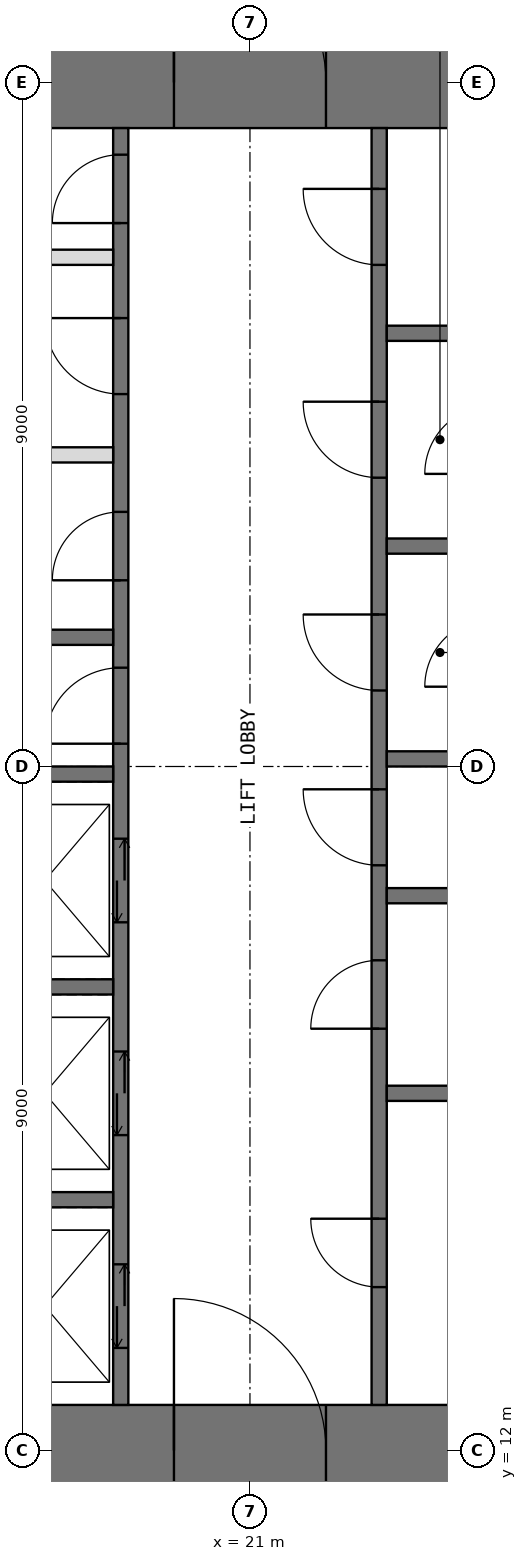
"""IFC4 building model, lengths in metres.
Left out: names, types, materials, properties, quantities, classifications, styles, units other than length and angle.
Written with IfcOpenShell. Run it as: python <this file> out.ifc"""

import sys

from ifc_helpers import new_model, si_unit, direction, frame, frame_2d, origin, place, context, subcontext, project, spatial, rectangle, extrude, element, fill, save


model = new_model("IFC4")
c1 = context("Model", 3, precision=1e-05, world=origin(), true_north=direction((0.0, 1.0)))
c2 = subcontext(c1, "Body", "Model", "MODEL_VIEW")
j1 = project(units=[si_unit("LENGTHUNIT", "METRE"), si_unit("PLANEANGLEUNIT", "RADIAN")], contexts=[c1])
p1 = place(None, origin())
s1 = spatial("IfcSite", under=j1, at=p1, CompositionType="ELEMENT")
p2 = place(p1, origin())
s2 = spatial("IfcBuilding", under=s1, at=p2, CompositionType="ELEMENT")
p3 = place(p2, frame((0.0, 0.0, 252.4)))
s3 = spatial("IfcBuildingStorey", under=s2, at=p3, CompositionType="ELEMENT", Elevation=252.4)
p4 = place(p3, frame((11.4, 12.0, -0.05), z_axis=(0.0, 0.0, 1.0), x_axis=(1.0, 0.0, 0.0)))
e1 = element("IfcWall", 1, at=p4, inside=s3, PredefinedType="SHEAR", context=c2, shape_type="SweptSolid", body=[
    extrude(rectangle(XDim=19.2, YDim=1.2, at=frame_2d((9.6, 0.0))), origin(), (0.0, 0.0, 1.0), 4.2),
])
p5 = place(p4, frame((8.6, 0.0, 0.05)))
e2 = element("IfcOpeningElement", 2, at=p5, cuts=e1, PredefinedType="OPENING", context=c2, shape_type="SweptSolid", body=[
    extrude(rectangle(XDim=2.0, YDim=2.2, at=frame_2d((1.0, 1.1))), frame((0.0, 0.61, 0.0), z_axis=(0.0, -1.0, 0.0), x_axis=(1.0, 0.0, 0.0)), (0.0, 0.0, 1.0), 1.22),
])
p6 = place(p3, frame((11.4, 30.0, -0.05), z_axis=(0.0, 0.0, 1.0), x_axis=(1.0, 0.0, 0.0)))
e3 = element("IfcWall", 3, at=p6, inside=s3, PredefinedType="SHEAR", context=c2, shape_type="SweptSolid", body=[
    extrude(rectangle(XDim=19.2, YDim=1.2, at=frame_2d((9.6, 0.0))), origin(), (0.0, 0.0, 1.0), 4.2),
])
p7 = place(p6, frame((8.6, 0.0, 0.05)))
e4 = element("IfcOpeningElement", 4, at=p7, cuts=e3, PredefinedType="OPENING", context=c2, shape_type="SweptSolid", body=[
    extrude(rectangle(XDim=2.0, YDim=2.2, at=frame_2d((1.0, 1.1))), frame((0.0, 0.61, 0.0), z_axis=(0.0, -1.0, 0.0), x_axis=(1.0, 0.0, 0.0)), (0.0, 0.0, 1.0), 1.22),
])
p8 = place(p3, frame((19.3, 12.6, -0.05), z_axis=(0.0, 0.0, 1.0), x_axis=(0.0, 1.0, 0.0)))
e5 = element("IfcWall", 5, at=p8, inside=s3, PredefinedType="SHEAR", context=c2, shape_type="SweptSolid", body=[
    extrude(rectangle(XDim=16.8, YDim=0.2, at=frame_2d((8.4, 0.0))), origin(), (0.0, 0.0, 1.0), 4.2),
])
p9 = place(p8, frame((8.7, 0.0, 0.05)))
e6 = element("IfcOpeningElement", 6, at=p9, cuts=e5, PredefinedType="OPENING", context=c2, shape_type="SweptSolid", body=[
    extrude(rectangle(XDim=1.0, YDim=2.2, at=frame_2d((0.5, 1.1))), frame((0.0, 0.11, 0.0), z_axis=(0.0, -1.0, 0.0), x_axis=(1.0, 0.0, 0.0)), (0.0, 0.0, 1.0), 0.22),
])
p10 = place(p8, frame((10.85, 0.0, 0.05)))
e7 = element("IfcOpeningElement", 7, at=p10, cuts=e5, PredefinedType="OPENING", context=c2, shape_type="SweptSolid", body=[
    extrude(rectangle(XDim=0.9, YDim=2.2, at=frame_2d((0.45, 1.1))), frame((0.0, 0.11, 0.0), z_axis=(0.0, -1.0, 0.0), x_axis=(1.0, 0.0, 0.0)), (0.0, 0.0, 1.0), 0.22),
])
p11 = place(p8, frame((13.3, 0.0, 0.05)))
e8 = element("IfcOpeningElement", 8, at=p11, cuts=e5, PredefinedType="OPENING", context=c2, shape_type="SweptSolid", body=[
    extrude(rectangle(XDim=1.0, YDim=2.2, at=frame_2d((0.5, 1.1))), frame((0.0, 0.11, 0.0), z_axis=(0.0, -1.0, 0.0), x_axis=(1.0, 0.0, 0.0)), (0.0, 0.0, 1.0), 0.22),
])
p12 = place(p8, frame((15.55, 0.0, 0.05)))
e9 = element("IfcOpeningElement", 9, at=p12, cuts=e5, PredefinedType="OPENING", context=c2, shape_type="SweptSolid", body=[
    extrude(rectangle(XDim=0.9, YDim=2.2, at=frame_2d((0.45, 1.1))), frame((0.0, 0.11, 0.0), z_axis=(0.0, -1.0, 0.0), x_axis=(1.0, 0.0, 0.0)), (0.0, 0.0, 1.0), 0.22),
])
p13 = place(p8, frame((0.75, 0.0, 0.05)))
e10 = element("IfcOpeningElement", 10, at=p13, cuts=e5, PredefinedType="OPENING", context=c2, shape_type="SweptSolid", body=[
    extrude(rectangle(XDim=1.1, YDim=2.2, at=frame_2d((0.55, 1.1))), frame((0.0, 0.11, 0.0), z_axis=(0.0, -1.0, 0.0), x_axis=(1.0, 0.0, 0.0)), (0.0, 0.0, 1.0), 0.22),
])
p14 = place(p8, frame((3.55, 0.0, 0.05)))
e11 = element("IfcOpeningElement", 11, at=p14, cuts=e5, PredefinedType="OPENING", context=c2, shape_type="SweptSolid", body=[
    extrude(rectangle(XDim=1.1, YDim=2.2, at=frame_2d((0.55, 1.1))), frame((0.0, 0.11, 0.0), z_axis=(0.0, -1.0, 0.0), x_axis=(1.0, 0.0, 0.0)), (0.0, 0.0, 1.0), 0.22),
])
p15 = place(p8, frame((6.35, 0.0, 0.05)))
e12 = element("IfcOpeningElement", 12, at=p15, cuts=e5, PredefinedType="OPENING", context=c2, shape_type="SweptSolid", body=[
    extrude(rectangle(XDim=1.1, YDim=2.2, at=frame_2d((0.55, 1.1))), frame((0.0, 0.11, 0.0), z_axis=(0.0, -1.0, 0.0), x_axis=(1.0, 0.0, 0.0)), (0.0, 0.0, 1.0), 0.22),
])
p16 = place(p3, frame((22.7, 12.6, -0.05), z_axis=(0.0, 0.0, 1.0), x_axis=(0.0, 1.0, 0.0)))
e13 = element("IfcWall", 13, at=p16, inside=s3, PredefinedType="SHEAR", context=c2, shape_type="SweptSolid", body=[
    extrude(rectangle(XDim=16.8, YDim=0.2, at=frame_2d((8.4, 0.0))), origin(), (0.0, 0.0, 1.0), 4.2),
])
p17 = place(p16, frame((7.1, 0.0, 0.05)))
e14 = element("IfcOpeningElement", 14, at=p17, cuts=e13, PredefinedType="OPENING", context=c2, shape_type="SweptSolid", body=[
    extrude(rectangle(XDim=1.0, YDim=2.2, at=frame_2d((0.5, 1.1))), frame((0.0, 0.11, 0.0), z_axis=(0.0, -1.0, 0.0), x_axis=(1.0, 0.0, 0.0)), (0.0, 0.0, 1.0), 0.22),
])
p18 = place(p16, frame((1.55, 0.0, 0.05)))
e15 = element("IfcOpeningElement", 15, at=p18, cuts=e13, PredefinedType="OPENING", context=c2, shape_type="SweptSolid", body=[
    extrude(rectangle(XDim=0.9, YDim=2.2, at=frame_2d((0.45, 1.1))), frame((0.0, 0.11, 0.0), z_axis=(0.0, -1.0, 0.0), x_axis=(1.0, 0.0, 0.0)), (0.0, 0.0, 1.0), 0.22),
])
p19 = place(p16, frame((4.95, 0.0, 0.05)))
e16 = element("IfcOpeningElement", 16, at=p19, cuts=e13, PredefinedType="OPENING", context=c2, shape_type="SweptSolid", body=[
    extrude(rectangle(XDim=0.9, YDim=2.2, at=frame_2d((0.45, 1.1))), frame((0.0, 0.11, 0.0), z_axis=(0.0, -1.0, 0.0), x_axis=(1.0, 0.0, 0.0)), (0.0, 0.0, 1.0), 0.22),
])
p20 = place(p16, frame((9.4, 0.0, 0.05)))
e17 = element("IfcOpeningElement", 17, at=p20, cuts=e13, PredefinedType="OPENING", context=c2, shape_type="SweptSolid", body=[
    extrude(rectangle(XDim=1.0, YDim=2.2, at=frame_2d((0.5, 1.1))), frame((0.0, 0.11, 0.0), z_axis=(0.0, -1.0, 0.0), x_axis=(1.0, 0.0, 0.0)), (0.0, 0.0, 1.0), 0.22),
])
p21 = place(p16, frame((12.2, 0.0, 0.05)))
e18 = element("IfcOpeningElement", 18, at=p21, cuts=e13, PredefinedType="OPENING", context=c2, shape_type="SweptSolid", body=[
    extrude(rectangle(XDim=1.0, YDim=2.2, at=frame_2d((0.5, 1.1))), frame((0.0, 0.11, 0.0), z_axis=(0.0, -1.0, 0.0), x_axis=(1.0, 0.0, 0.0)), (0.0, 0.0, 1.0), 0.22),
])
p22 = place(p16, frame((15.0, 0.0, 0.05)))
e19 = element("IfcOpeningElement", 19, at=p22, cuts=e13, PredefinedType="OPENING", context=c2, shape_type="SweptSolid", body=[
    extrude(rectangle(XDim=1.0, YDim=2.2, at=frame_2d((0.5, 1.1))), frame((0.0, 0.11, 0.0), z_axis=(0.0, -1.0, 0.0), x_axis=(1.0, 0.0, 0.0)), (0.0, 0.0, 1.0), 0.22),
])
for number, where, z_axis, x_axis in (
    (20, (16.0, 15.3, -0.05), (0.0, 0.0, 1.0), (1.0, 0.0, 0.0)),
    (21, (16.0, 18.1, -0.05), (0.0, 0.0, 1.0), (1.0, 0.0, 0.0)),
    (22, (16.0, 20.9, -0.05), (0.0, 0.0, 1.0), (1.0, 0.0, 0.0)),
    (23, (16.0, 22.7, -0.05), (0.0, 0.0, 1.0), (1.0, 0.0, 0.0)),
):
    element("IfcWall", number, at=place(p3, frame(where, z_axis=z_axis, x_axis=x_axis)), inside=s3, PredefinedType="SHEAR", context=c2, shape_type="SweptSolid", body=[
        extrude(rectangle(XDim=3.2, YDim=0.2, at=frame_2d((1.6, 0.0))), origin(), (0.0, 0.0, 1.0), 4.2),
    ])
for number, where, z_axis, x_axis in (
    (24, (16.0, 25.1, 0.0), (0.0, 0.0, 1.0), (1.0, 0.0, 0.0)),
    (25, (16.0, 27.7, 0.0), (0.0, 0.0, 1.0), (1.0, 0.0, 0.0)),
):
    element("IfcWall", number, at=place(p3, frame(where, z_axis=z_axis, x_axis=x_axis)), inside=s3, PredefinedType="PARTITIONING", context=c2, shape_type="SweptSolid", body=[
        extrude(rectangle(XDim=3.2, YDim=0.2, at=frame_2d((1.6, 0.0))), origin(), (0.0, 0.0, 1.0), 3.95),
    ])
for number, where, z_axis, x_axis in (
    (26, (22.8, 16.7, -0.05), (0.0, 0.0, 1.0), (1.0, 0.0, 0.0)),
    (27, (22.8, 19.3, -0.05), (0.0, 0.0, 1.0), (1.0, 0.0, 0.0)),
    (28, (22.8, 21.1, -0.05), (0.0, 0.0, 1.0), (1.0, 0.0, 0.0)),
    (29, (22.8, 23.9, -0.05), (0.0, 0.0, 1.0), (1.0, 0.0, 0.0)),
    (30, (22.8, 26.7, -0.05), (0.0, 0.0, 1.0), (1.0, 0.0, 0.0)),
):
    element("IfcWall", number, at=place(p3, frame(where, z_axis=z_axis, x_axis=x_axis)), inside=s3, PredefinedType="SHEAR", context=c2, shape_type="SweptSolid", body=[
        extrude(rectangle(XDim=3.2, YDim=0.2, at=frame_2d((1.6, 0.0))), origin(), (0.0, 0.0, 1.0), 4.2),
    ])
p23 = place(p5, origin())
e31 = element("IfcDoor", 31, at=p23, inside=s3, OperationType="DOUBLE_DOOR_SINGLE_SWING", PredefinedType="DOOR", context=c2, shape_type="SweptSolid", body=[
    extrude(rectangle(XDim=2.0, YDim=2.2, at=frame_2d((1.0, 1.1))), frame((0.0, 0.025, 0.0), z_axis=(0.0, -1.0, 0.0), x_axis=(1.0, 0.0, 0.0)), (0.0, 0.0, 1.0), 0.05),
])
fill(e2, e31)
p24 = place(p7, origin())
e32 = element("IfcDoor", 32, at=p24, inside=s3, OperationType="DOUBLE_DOOR_SINGLE_SWING", PredefinedType="DOOR", context=c2, shape_type="SweptSolid", body=[
    extrude(rectangle(XDim=2.0, YDim=2.2, at=frame_2d((1.0, 1.1))), frame((0.0, 0.025, 0.0), z_axis=(0.0, -1.0, 0.0), x_axis=(1.0, 0.0, 0.0)), (0.0, 0.0, 1.0), 0.05),
])
fill(e4, e32)
p25 = place(p9, origin())
e33 = element("IfcDoor", 33, at=p25, inside=s3, OperationType="SINGLE_SWING_LEFT", PredefinedType="DOOR", context=c2, shape_type="SweptSolid", body=[
    extrude(rectangle(XDim=1.0, YDim=2.2, at=frame_2d((0.5, 1.1))), frame((0.0, 0.025, 0.0), z_axis=(0.0, -1.0, 0.0), x_axis=(1.0, 0.0, 0.0)), (0.0, 0.0, 1.0), 0.05),
])
fill(e6, e33)
p26 = place(p17, origin())
e34 = element("IfcDoor", 34, at=p26, inside=s3, OperationType="SINGLE_SWING_RIGHT", PredefinedType="DOOR", context=c2, shape_type="SweptSolid", body=[
    extrude(rectangle(XDim=1.0, YDim=2.2, at=frame_2d((0.5, 1.1))), frame((0.0, 0.025, 0.0), z_axis=(0.0, -1.0, 0.0), x_axis=(1.0, 0.0, 0.0)), (0.0, 0.0, 1.0), 0.05),
])
fill(e14, e34)
p27 = place(p10, origin())
e35 = element("IfcDoor", 35, at=p27, inside=s3, OperationType="SINGLE_SWING_LEFT", PredefinedType="DOOR", context=c2, shape_type="SweptSolid", body=[
    extrude(rectangle(XDim=0.9, YDim=2.2, at=frame_2d((0.45, 1.1))), frame((0.0, 0.025, 0.0), z_axis=(0.0, -1.0, 0.0), x_axis=(1.0, 0.0, 0.0)), (0.0, 0.0, 1.0), 0.05),
])
fill(e7, e35)
p28 = place(p11, origin())
e36 = element("IfcDoor", 36, at=p28, inside=s3, OperationType="SINGLE_SWING_RIGHT", PredefinedType="DOOR", context=c2, shape_type="SweptSolid", body=[
    extrude(rectangle(XDim=1.0, YDim=2.2, at=frame_2d((0.5, 1.1))), frame((0.0, 0.025, 0.0), z_axis=(0.0, -1.0, 0.0), x_axis=(1.0, 0.0, 0.0)), (0.0, 0.0, 1.0), 0.05),
])
fill(e8, e36)
p29 = place(p12, origin())
e37 = element("IfcDoor", 37, at=p29, inside=s3, OperationType="SINGLE_SWING_LEFT", PredefinedType="DOOR", context=c2, shape_type="SweptSolid", body=[
    extrude(rectangle(XDim=0.9, YDim=2.2, at=frame_2d((0.45, 1.1))), frame((0.0, 0.025, 0.0), z_axis=(0.0, -1.0, 0.0), x_axis=(1.0, 0.0, 0.0)), (0.0, 0.0, 1.0), 0.05),
])
fill(e9, e37)
p30 = place(p18, origin())
e38 = element("IfcDoor", 38, at=p30, inside=s3, OperationType="SINGLE_SWING_RIGHT", PredefinedType="DOOR", context=c2, shape_type="SweptSolid", body=[
    extrude(rectangle(XDim=0.9, YDim=2.2, at=frame_2d((0.45, 1.1))), frame((0.0, 0.025, 0.0), z_axis=(0.0, -1.0, 0.0), x_axis=(1.0, 0.0, 0.0)), (0.0, 0.0, 1.0), 0.05),
])
fill(e15, e38)
p31 = place(p19, origin())
e39 = element("IfcDoor", 39, at=p31, inside=s3, OperationType="SINGLE_SWING_LEFT", PredefinedType="DOOR", context=c2, shape_type="SweptSolid", body=[
    extrude(rectangle(XDim=0.9, YDim=2.2, at=frame_2d((0.45, 1.1))), frame((0.0, 0.025, 0.0), z_axis=(0.0, -1.0, 0.0), x_axis=(1.0, 0.0, 0.0)), (0.0, 0.0, 1.0), 0.05),
])
fill(e16, e39)
p32 = place(p20, origin())
e40 = element("IfcDoor", 40, at=p32, inside=s3, OperationType="SINGLE_SWING_RIGHT", PredefinedType="DOOR", context=c2, shape_type="SweptSolid", body=[
    extrude(rectangle(XDim=1.0, YDim=2.2, at=frame_2d((0.5, 1.1))), frame((0.0, 0.025, 0.0), z_axis=(0.0, -1.0, 0.0), x_axis=(1.0, 0.0, 0.0)), (0.0, 0.0, 1.0), 0.05),
])
fill(e17, e40)
p33 = place(p21, origin())
e41 = element("IfcDoor", 41, at=p33, inside=s3, OperationType="SINGLE_SWING_RIGHT", PredefinedType="DOOR", context=c2, shape_type="SweptSolid", body=[
    extrude(rectangle(XDim=1.0, YDim=2.2, at=frame_2d((0.5, 1.1))), frame((0.0, 0.025, 0.0), z_axis=(0.0, -1.0, 0.0), x_axis=(1.0, 0.0, 0.0)), (0.0, 0.0, 1.0), 0.05),
])
fill(e18, e41)
p34 = place(p22, origin())
e42 = element("IfcDoor", 42, at=p34, inside=s3, OperationType="SINGLE_SWING_RIGHT", PredefinedType="DOOR", context=c2, shape_type="SweptSolid", body=[
    extrude(rectangle(XDim=1.0, YDim=2.2, at=frame_2d((0.5, 1.1))), frame((0.0, 0.025, 0.0), z_axis=(0.0, -1.0, 0.0), x_axis=(1.0, 0.0, 0.0)), (0.0, 0.0, 1.0), 0.05),
])
fill(e19, e42)
p35 = place(p13, origin())
e43 = element("IfcDoor", 43, at=p35, inside=s3, OperationType="DOUBLE_DOOR_SLIDING", PredefinedType="DOOR", context=c2, shape_type="SweptSolid", body=[
    extrude(rectangle(XDim=1.1, YDim=2.2, at=frame_2d((0.55, 1.1))), frame((0.0, 0.025, 0.0), z_axis=(0.0, -1.0, 0.0), x_axis=(1.0, 0.0, 0.0)), (0.0, 0.0, 1.0), 0.05),
])
fill(e10, e43)
p36 = place(p14, origin())
e44 = element("IfcDoor", 44, at=p36, inside=s3, OperationType="DOUBLE_DOOR_SLIDING", PredefinedType="DOOR", context=c2, shape_type="SweptSolid", body=[
    extrude(rectangle(XDim=1.1, YDim=2.2, at=frame_2d((0.55, 1.1))), frame((0.0, 0.025, 0.0), z_axis=(0.0, -1.0, 0.0), x_axis=(1.0, 0.0, 0.0)), (0.0, 0.0, 1.0), 0.05),
])
fill(e11, e44)
p37 = place(p15, origin())
e45 = element("IfcDoor", 45, at=p37, inside=s3, OperationType="DOUBLE_DOOR_SLIDING", PredefinedType="DOOR", context=c2, shape_type="SweptSolid", body=[
    extrude(rectangle(XDim=1.1, YDim=2.2, at=frame_2d((0.55, 1.1))), frame((0.0, 0.025, 0.0), z_axis=(0.0, -1.0, 0.0), x_axis=(1.0, 0.0, 0.0)), (0.0, 0.0, 1.0), 0.05),
])
fill(e12, e45)
save(model, sys.argv[1])
